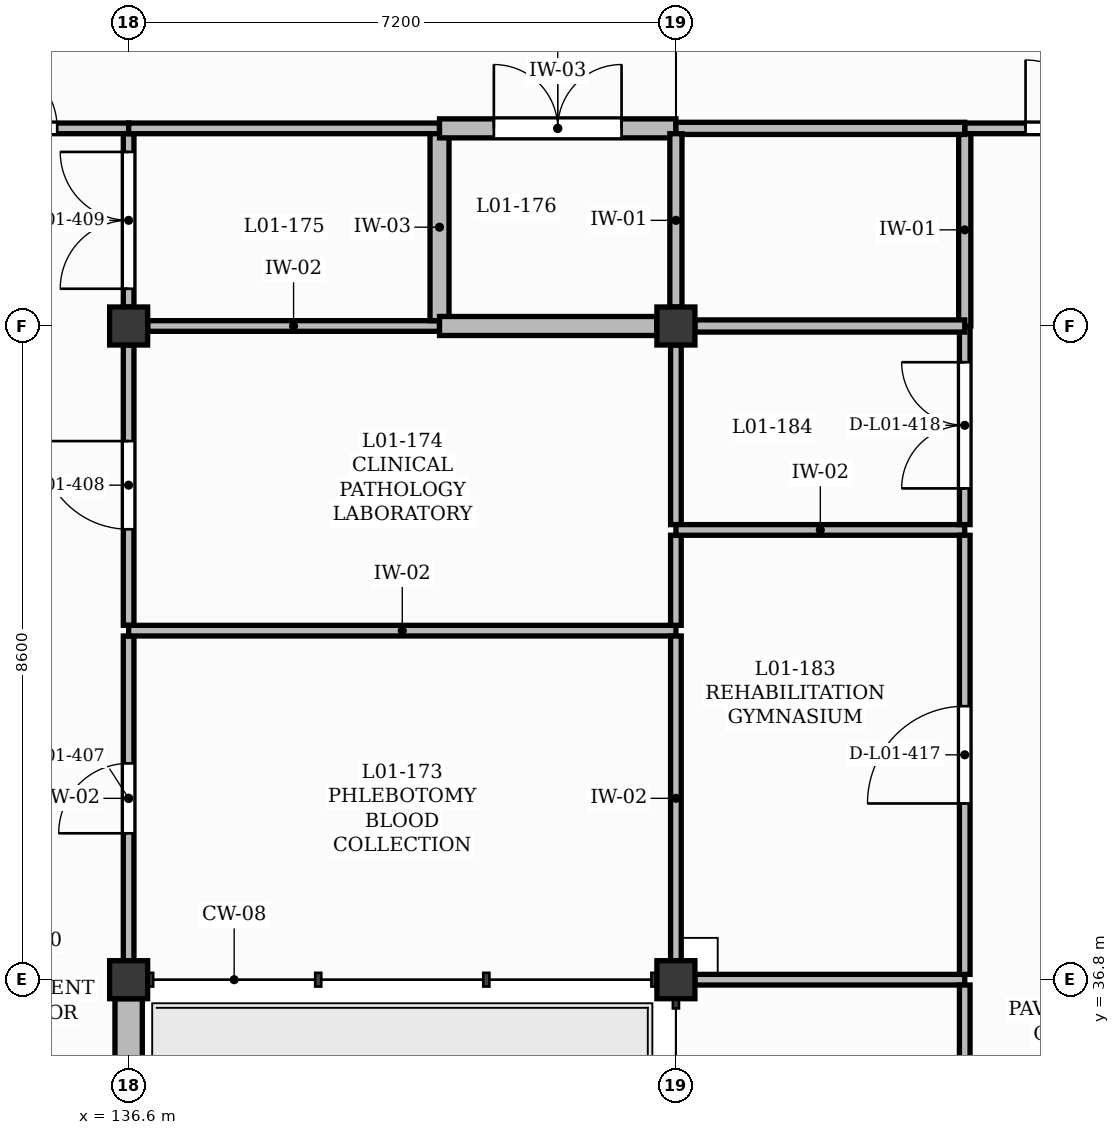
"""IFC4 building model, lengths in metres.
Left out: names, types, materials, properties, quantities, classifications, styles, units other than length and angle.
Written with IfcOpenShell. Run it as: python <this file> out.ifc"""

import sys

from ifc_helpers import new_model, si_unit, direction, frame, frame_2d, origin, origin_2d, place, context, subcontext, project, spatial, rectangle, extrude, element, fill, save


model = new_model("IFC4")
c1 = context("Model", 3, precision=1e-05, world=origin(), true_north=direction((0.0, 1.0)))
c2 = subcontext(c1, "Body", "Model", "MODEL_VIEW")
j1 = project(units=[si_unit("LENGTHUNIT", "METRE"), si_unit("PLANEANGLEUNIT", "RADIAN")], contexts=[c1])
p1 = place(None, origin())
s1 = spatial("IfcSite", under=j1, at=p1, CompositionType="ELEMENT")
p2 = place(p1, origin())
s2 = spatial("IfcBuilding", under=s1, at=p2, CompositionType="ELEMENT")
p3 = place(p2, frame((0.0, 0.0, 4.5)))
s3 = spatial("IfcBuildingStorey", under=s2, at=p3, CompositionType="ELEMENT", Elevation=4.5)
for number, where, z_axis, x_axis in (
    (1, (136.6, 36.8, 0.0), (0.0, 0.0, 1.0), (1.0, 0.0, 0.0)),
    (2, (136.6, 45.4, 0.0), (0.0, 0.0, 1.0), (1.0, 0.0, 0.0)),
    (3, (143.8, 36.8, 0.0), (0.0, 0.0, 1.0), (1.0, 0.0, 0.0)),
    (4, (143.8, 45.4, 0.0), (0.0, 0.0, 1.0), (1.0, 0.0, 0.0)),
):
    element("IfcColumn", number, at=place(p3, frame(where, z_axis=z_axis, x_axis=x_axis)), inside=s3, PredefinedType="COLUMN", context=c2, shape_type="SweptSolid", body=[
        extrude(rectangle(XDim=0.5, YDim=0.5, at=origin_2d()), origin(), (0.0, 0.0, 1.0), 4.22),
    ])
p4 = place(p3, frame((136.6, 27.45, 0.0), z_axis=(0.0, 0.0, 1.0), x_axis=(0.0, 1.0, 0.0)))
e5 = element("IfcWall", 5, at=p4, inside=s3, PredefinedType="SOLIDWALL", context=c2, shape_type="SweptSolid", body=[
    extrude(rectangle(XDim=9.1, YDim=0.36, at=frame_2d((4.55, 0.0))), origin(), (0.0, 0.0, 1.0), 3.52),
])
p5 = place(p4, frame((3.45, 0.0, 0.0)))
e6 = element("IfcOpeningElement", 6, at=p5, cuts=e5, PredefinedType="OPENING", context=c2, shape_type="SweptSolid", body=[
    extrude(rectangle(XDim=2.2, YDim=2.5, at=frame_2d((1.1, 1.25))), frame((0.0, 0.19, 0.0), z_axis=(0.0, -1.0, 0.0), x_axis=(1.0, 0.0, 0.0)), (0.0, 0.0, 1.0), 0.38),
])
p6 = place(p4, frame((0.915, 0.0, 1.5)))
e7 = element("IfcOpeningElement", 7, at=p6, cuts=e5, PredefinedType="OPENING", context=c2, shape_type="SweptSolid", body=[
    extrude(rectangle(XDim=1.68, YDim=1.25, at=frame_2d((0.84, 0.625))), frame((0.0, 0.19, 0.0), z_axis=(0.0, -1.0, 0.0), x_axis=(1.0, 0.0, 0.0)), (0.0, 0.0, 1.0), 0.38),
])
p7 = place(p4, frame((6.42, 0.0, 1.5)))
e8 = element("IfcOpeningElement", 8, at=p7, cuts=e5, PredefinedType="OPENING", context=c2, shape_type="SweptSolid", body=[
    extrude(rectangle(XDim=1.85, YDim=1.25, at=frame_2d((0.925, 0.625))), frame((0.0, 0.19, 0.0), z_axis=(0.0, -1.0, 0.0), x_axis=(1.0, 0.0, 0.0)), (0.0, 0.0, 1.0), 0.38),
])
p8 = place(p3, frame((133.8, 48.0, 0.0), z_axis=(0.0, 0.0, 1.0), x_axis=(1.0, 0.0, 0.0)))
e9 = element("IfcWall", 9, at=p8, inside=s3, PredefinedType="PARTITIONING", context=c2, shape_type="SweptSolid", body=[
    extrude(rectangle(XDim=2.8, YDim=0.14, at=frame_2d((1.4, 0.0))), origin(), (0.0, 0.0, 1.0), 4.18),
])
p9 = place(p8, frame((0.94, 0.0, 0.0)))
e10 = element("IfcOpeningElement", 10, at=p9, cuts=e9, PredefinedType="OPENING", context=c2, shape_type="SweptSolid", body=[
    extrude(rectangle(XDim=0.92, YDim=2.1, at=frame_2d((0.46, 1.05))), frame((0.0, 0.08, 0.0), z_axis=(0.0, -1.0, 0.0), x_axis=(1.0, 0.0, 0.0)), (0.0, 0.0, 1.0), 0.16),
])
p10 = place(p3, frame((136.6, 37.05, 0.0), z_axis=(0.0, 0.0, 1.0), x_axis=(0.0, 1.0, 0.0)))
e11 = element("IfcWall", 11, at=p10, inside=s3, PredefinedType="PARTITIONING", context=c2, shape_type="SweptSolid", body=[
    extrude(rectangle(XDim=4.272, YDim=0.14, at=frame_2d((2.136, 0.0))), origin(), (0.0, 0.0, 1.0), 3.52),
])
p11 = place(p10, frame((1.676, 0.0, 0.0)))
e12 = element("IfcOpeningElement", 12, at=p11, cuts=e11, PredefinedType="OPENING", context=c2, shape_type="SweptSolid", body=[
    extrude(rectangle(XDim=0.92, YDim=2.1, at=frame_2d((0.46, 1.05))), frame((0.0, 0.08, 0.0), z_axis=(0.0, -1.0, 0.0), x_axis=(1.0, 0.0, 0.0)), (0.0, 0.0, 1.0), 0.16),
])
p12 = place(p3, frame((136.6, 41.462, 0.0), z_axis=(0.0, 0.0, 1.0), x_axis=(0.0, 1.0, 0.0)))
e13 = element("IfcWall", 13, at=p12, inside=s3, PredefinedType="PARTITIONING", context=c2, shape_type="SweptSolid", body=[
    extrude(rectangle(XDim=3.688, YDim=0.14, at=frame_2d((1.844, 0.0))), origin(), (0.0, 0.0, 1.0), 3.52),
])
p13 = place(p12, frame((1.264, 0.0, 0.0)))
e14 = element("IfcOpeningElement", 14, at=p13, cuts=e13, PredefinedType="OPENING", context=c2, shape_type="SweptSolid", body=[
    extrude(rectangle(XDim=1.16, YDim=2.1, at=frame_2d((0.58, 1.05))), frame((0.0, 0.08, 0.0), z_axis=(0.0, -1.0, 0.0), x_axis=(1.0, 0.0, 0.0)), (0.0, 0.0, 1.0), 0.16),
])
p14 = place(p3, frame((136.6, 41.392, 0.0), z_axis=(0.0, 0.0, 1.0), x_axis=(1.0, 0.0, 0.0)))
e15 = element("IfcWall", 15, at=p14, inside=s3, PredefinedType="PARTITIONING", context=c2, shape_type="SweptSolid", body=[
    extrude(rectangle(XDim=7.2, YDim=0.14, at=frame_2d((3.6, 0.0))), origin(), (0.0, 0.0, 1.0), 4.18),
])
p15 = place(p3, frame((136.6, 45.65, 0.0), z_axis=(0.0, 0.0, 1.0), x_axis=(0.0, 1.0, 0.0)))
e16 = element("IfcWall", 16, at=p15, inside=s3, PredefinedType="PARTITIONING", context=c2, shape_type="SweptSolid", body=[
    extrude(rectangle(XDim=2.28, YDim=0.14, at=frame_2d((1.14, 0.0))), origin(), (0.0, 0.0, 1.0), 3.52),
])
p16 = place(p15, frame((0.24, 0.0, 0.0)))
e17 = element("IfcOpeningElement", 17, at=p16, cuts=e16, PredefinedType="OPENING", context=c2, shape_type="SweptSolid", body=[
    extrude(rectangle(XDim=1.8, YDim=2.3, at=frame_2d((0.9, 1.15))), frame((0.0, 0.08, 0.0), z_axis=(0.0, -1.0, 0.0), x_axis=(1.0, 0.0, 0.0)), (0.0, 0.0, 1.0), 0.16),
])
p17 = place(p3, frame((136.85, 45.4, 0.0), z_axis=(0.0, 0.0, 1.0), x_axis=(1.0, 0.0, 0.0)))
e18 = element("IfcWall", 18, at=p17, inside=s3, PredefinedType="PARTITIONING", context=c2, shape_type="SweptSolid", body=[
    extrude(rectangle(XDim=3.84, YDim=0.14, at=frame_2d((1.92, 0.0))), origin(), (0.0, 0.0, 1.0), 3.52),
])
p18 = place(p3, frame((136.6, 48.0, 0.0), z_axis=(0.0, 0.0, 1.0), x_axis=(1.0, 0.0, 0.0)))
e19 = element("IfcWall", 19, at=p18, inside=s3, PredefinedType="PARTITIONING", context=c2, shape_type="SweptSolid", body=[
    extrude(rectangle(XDim=4.09, YDim=0.14, at=frame_2d((2.045, 0.0))), origin(), (0.0, 0.0, 1.0), 4.18),
])
p19 = place(p3, frame((140.69, 45.47, 0.0), z_axis=(0.0, 0.0, 1.0), x_axis=(0.0, 1.0, 0.0)))
e20 = element("IfcWall", 20, at=p19, inside=s3, PredefinedType="SOLIDWALL", context=c2, shape_type="SweptSolid", body=[
    extrude(rectangle(XDim=2.46, YDim=0.25, at=frame_2d((1.23, 0.0))), origin(), (0.0, 0.0, 1.0), 4.18),
])
p20 = place(p3, frame((140.69, 45.4, 0.0), z_axis=(0.0, 0.0, 1.0), x_axis=(1.0, 0.0, 0.0)))
e21 = element("IfcWall", 21, at=p20, inside=s3, PredefinedType="SOLIDWALL", context=c2, shape_type="SweptSolid", body=[
    extrude(rectangle(XDim=2.86, YDim=0.25, at=frame_2d((1.43, 0.0))), origin(), (0.0, 0.0, 1.0), 3.52),
])
p21 = place(p3, frame((140.69, 48.0, 0.0), z_axis=(0.0, 0.0, 1.0), x_axis=(1.0, 0.0, 0.0)))
e22 = element("IfcWall", 22, at=p21, inside=s3, PredefinedType="SOLIDWALL", context=c2, shape_type="SweptSolid", body=[
    extrude(rectangle(XDim=3.11, YDim=0.25, at=frame_2d((1.555, 0.0))), origin(), (0.0, 0.0, 1.0), 4.18),
])
p22 = place(p21, frame((0.715, 0.0, 0.0)))
e23 = element("IfcOpeningElement", 23, at=p22, cuts=e22, PredefinedType="OPENING", context=c2, shape_type="SweptSolid", body=[
    extrude(rectangle(XDim=1.68, YDim=2.3, at=frame_2d((0.84, 1.15))), frame((0.0, 0.135, 0.0), z_axis=(0.0, -1.0, 0.0), x_axis=(1.0, 0.0, 0.0)), (0.0, 0.0, 1.0), 0.27),
])
p23 = place(p3, frame((143.8, 37.05, 0.0), z_axis=(0.0, 0.0, 1.0), x_axis=(0.0, 1.0, 0.0)))
e24 = element("IfcWall", 24, at=p23, inside=s3, PredefinedType="PARTITIONING", context=c2, shape_type="SweptSolid", body=[
    extrude(rectangle(XDim=4.272, YDim=0.14, at=frame_2d((2.136, 0.0))), origin(), (0.0, 0.0, 1.0), 3.52),
])
p24 = place(p3, frame((144.05, 36.8, 0.0), z_axis=(0.0, 0.0, 1.0), x_axis=(1.0, 0.0, 0.0)))
e25 = element("IfcWall", 25, at=p24, inside=s3, PredefinedType="PARTITIONING", context=c2, shape_type="SweptSolid", body=[
    extrude(rectangle(XDim=3.55, YDim=0.14, at=frame_2d((1.775, 0.0))), origin(), (0.0, 0.0, 1.0), 3.58),
])
p25 = place(p3, frame((143.8, 41.462, 0.0), z_axis=(0.0, 0.0, 1.0), x_axis=(0.0, 1.0, 0.0)))
e26 = element("IfcWall", 26, at=p25, inside=s3, PredefinedType="PARTITIONING", context=c2, shape_type="SweptSolid", body=[
    extrude(rectangle(XDim=1.185, YDim=0.14, at=frame_2d((0.593, 0.0))), origin(), (0.0, 0.0, 1.0), 3.52),
])
p26 = place(p3, frame((143.8, 42.787, 0.0), z_axis=(0.0, 0.0, 1.0), x_axis=(0.0, 1.0, 0.0)))
e27 = element("IfcWall", 27, at=p26, inside=s3, PredefinedType="PARTITIONING", context=c2, shape_type="SweptSolid", body=[
    extrude(rectangle(XDim=2.363, YDim=0.14, at=frame_2d((1.181, 0.0))), origin(), (0.0, 0.0, 1.0), 3.52),
])
p27 = place(p3, frame((143.8, 42.717, 0.0), z_axis=(0.0, 0.0, 1.0), x_axis=(1.0, 0.0, 0.0)))
e28 = element("IfcWall", 28, at=p27, inside=s3, PredefinedType="PARTITIONING", context=c2, shape_type="SweptSolid", body=[
    extrude(rectangle(XDim=3.8, YDim=0.14, at=frame_2d((1.9, 0.0))), origin(), (0.0, 0.0, 1.0), 4.18),
])
p28 = place(p3, frame((147.6, 31.744, 0.0), z_axis=(0.0, 0.0, 1.0), x_axis=(0.0, 1.0, 0.0)))
e29 = element("IfcWall", 29, at=p28, inside=s3, PredefinedType="PARTITIONING", context=c2, shape_type="SweptSolid", body=[
    extrude(rectangle(XDim=4.986, YDim=0.14, at=frame_2d((2.493, 0.0))), origin(), (0.0, 0.0, 1.0), 4.18),
])
p29 = place(p28, frame((1.663, 0.0, 0.0)))
e30 = element("IfcOpeningElement", 30, at=p29, cuts=e29, PredefinedType="OPENING", context=c2, shape_type="SweptSolid", body=[
    extrude(rectangle(XDim=1.66, YDim=2.3, at=frame_2d((0.83, 1.15))), frame((0.0, 0.08, 0.0), z_axis=(0.0, -1.0, 0.0), x_axis=(1.0, 0.0, 0.0)), (0.0, 0.0, 1.0), 0.16),
])
p30 = place(p3, frame((147.6, 36.87, 0.0), z_axis=(0.0, 0.0, 1.0), x_axis=(0.0, 1.0, 0.0)))
e31 = element("IfcWall", 31, at=p30, inside=s3, PredefinedType="PARTITIONING", context=c2, shape_type="SweptSolid", body=[
    extrude(rectangle(XDim=5.777, YDim=0.14, at=frame_2d((2.888, 0.0))), origin(), (0.0, 0.0, 1.0), 4.18),
])
p31 = place(p30, frame((2.249, 0.0, 0.0)))
e32 = element("IfcOpeningElement", 32, at=p31, cuts=e31, PredefinedType="OPENING", context=c2, shape_type="SweptSolid", body=[
    extrude(rectangle(XDim=1.28, YDim=2.2, at=frame_2d((0.64, 1.1))), frame((0.0, 0.08, 0.0), z_axis=(0.0, -1.0, 0.0), x_axis=(1.0, 0.0, 0.0)), (0.0, 0.0, 1.0), 0.16),
])
p32 = place(p3, frame((147.6, 42.787, 0.0), z_axis=(0.0, 0.0, 1.0), x_axis=(0.0, 1.0, 0.0)))
e33 = element("IfcWall", 33, at=p32, inside=s3, PredefinedType="PARTITIONING", context=c2, shape_type="SweptSolid", body=[
    extrude(rectangle(XDim=2.613, YDim=0.14, at=frame_2d((1.306, 0.0))), origin(), (0.0, 0.0, 1.0), 4.18),
])
p33 = place(p32, frame((0.477, 0.0, 0.0)))
e34 = element("IfcOpeningElement", 34, at=p33, cuts=e33, PredefinedType="OPENING", context=c2, shape_type="SweptSolid", body=[
    extrude(rectangle(XDim=1.66, YDim=2.3, at=frame_2d((0.83, 1.15))), frame((0.0, 0.08, 0.0), z_axis=(0.0, -1.0, 0.0), x_axis=(1.0, 0.0, 0.0)), (0.0, 0.0, 1.0), 0.16),
])
p34 = place(p3, frame((147.6, 48.0, 0.0), z_axis=(0.0, 0.0, 1.0), x_axis=(1.0, 0.0, 0.0)))
e35 = element("IfcWall", 35, at=p34, inside=s3, PredefinedType="PARTITIONING", context=c2, shape_type="SweptSolid", body=[
    extrude(rectangle(XDim=3.4, YDim=0.14, at=frame_2d((1.7, 0.0))), origin(), (0.0, 0.0, 1.0), 4.18),
])
p35 = place(p34, frame((0.8, 0.0, 0.0)))
e36 = element("IfcOpeningElement", 36, at=p35, cuts=e35, PredefinedType="OPENING", context=c2, shape_type="SweptSolid", body=[
    extrude(rectangle(XDim=1.8, YDim=2.3, at=frame_2d((0.9, 1.15))), frame((0.0, 0.08, 0.0), z_axis=(0.0, -1.0, 0.0), x_axis=(1.0, 0.0, 0.0)), (0.0, 0.0, 1.0), 0.16),
])
p36 = place(p3, frame((147.6, 45.4, 0.0), z_axis=(0.0, 0.0, 1.0), x_axis=(0.0, 1.0, 0.0)))
e37 = element("IfcWall", 37, at=p36, inside=s3, PredefinedType="PARTITIONING", context=c2, shape_type="SweptSolid", body=[
    extrude(rectangle(XDim=2.53, YDim=0.16, at=frame_2d((1.265, 0.0))), origin(), (0.0, 0.0, 1.0), 4.18),
])
p37 = place(p3, frame((143.8, 48.0, 0.0), z_axis=(0.0, 0.0, 1.0), x_axis=(1.0, 0.0, 0.0)))
e38 = element("IfcWall", 38, at=p37, inside=s3, PredefinedType="PARTITIONING", context=c2, shape_type="SweptSolid", body=[
    extrude(rectangle(XDim=3.8, YDim=0.16, at=frame_2d((1.9, 0.0))), origin(), (0.0, 0.0, 1.0), 4.18),
])
p38 = place(p3, frame((143.8, 45.65, 0.0), z_axis=(0.0, 0.0, 1.0), x_axis=(0.0, 1.0, 0.0)))
e39 = element("IfcWall", 39, at=p38, inside=s3, PredefinedType="PARTITIONING", context=c2, shape_type="SweptSolid", body=[
    extrude(rectangle(XDim=2.28, YDim=0.16, at=frame_2d((1.14, 0.0))), origin(), (0.0, 0.0, 1.0), 3.52),
])
p39 = place(p3, frame((147.6, 45.4, 0.0), z_axis=(0.0, 0.0, 1.0), x_axis=(-1.0, 0.0, 0.0)))
e40 = element("IfcWall", 40, at=p39, inside=s3, PredefinedType="PARTITIONING", context=c2, shape_type="SweptSolid", body=[
    extrude(rectangle(XDim=3.55, YDim=0.16, at=frame_2d((1.775, 0.0))), origin(), (0.0, 0.0, 1.0), 3.62),
])
p40 = place(p35, origin())
e41 = element("IfcDoor", 41, at=p40, inside=s3, OperationType="DOUBLE_DOOR_SINGLE_SWING", PredefinedType="DOOR", context=c2, shape_type="SweptSolid", body=[
    extrude(rectangle(XDim=1.8, YDim=2.3, at=frame_2d((0.9, 1.15))), frame((0.0, 0.025, 0.0), z_axis=(0.0, -1.0, 0.0), x_axis=(1.0, 0.0, 0.0)), (0.0, 0.0, 1.0), 0.05),
])
fill(e36, e41)
p41 = place(p9, origin())
e42 = element("IfcDoor", 42, at=p41, inside=s3, OperationType="SINGLE_SWING_LEFT", PredefinedType="DOOR", context=c2, shape_type="SweptSolid", body=[
    extrude(rectangle(XDim=0.92, YDim=2.1, at=frame_2d((0.46, 1.05))), frame((0.0, 0.025, 0.0), z_axis=(0.0, -1.0, 0.0), x_axis=(1.0, 0.0, 0.0)), (0.0, 0.0, 1.0), 0.05),
])
fill(e10, e42)
p42 = place(p11, origin())
e43 = element("IfcDoor", 43, at=p42, inside=s3, OperationType="SINGLE_SWING_LEFT", PredefinedType="DOOR", context=c2, shape_type="SweptSolid", body=[
    extrude(rectangle(XDim=0.92, YDim=2.1, at=frame_2d((0.46, 1.05))), frame((0.0, 0.025, 0.0), z_axis=(0.0, -1.0, 0.0), x_axis=(1.0, 0.0, 0.0)), (0.0, 0.0, 1.0), 0.05),
])
fill(e12, e43)
p43 = place(p13, origin())
e44 = element("IfcDoor", 44, at=p43, inside=s3, OperationType="SINGLE_SWING_RIGHT", PredefinedType="DOOR", context=c2, shape_type="SweptSolid", body=[
    extrude(rectangle(XDim=1.16, YDim=2.1, at=frame_2d((0.58, 1.05))), frame((0.0, 0.025, 0.0), z_axis=(0.0, -1.0, 0.0), x_axis=(1.0, 0.0, 0.0)), (0.0, 0.0, 1.0), 0.05),
])
fill(e14, e44)
p44 = place(p16, origin())
e45 = element("IfcDoor", 45, at=p44, inside=s3, OperationType="DOUBLE_DOOR_SINGLE_SWING", PredefinedType="DOOR", context=c2, shape_type="SweptSolid", body=[
    extrude(rectangle(XDim=1.8, YDim=2.3, at=frame_2d((0.9, 1.15))), frame((0.0, 0.025, 0.0), z_axis=(0.0, -1.0, 0.0), x_axis=(1.0, 0.0, 0.0)), (0.0, 0.0, 1.0), 0.05),
])
fill(e17, e45)
p45 = place(p22, origin())
e46 = element("IfcDoor", 46, at=p45, inside=s3, OperationType="DOUBLE_DOOR_SINGLE_SWING", PredefinedType="DOOR", context=c2, shape_type="SweptSolid", body=[
    extrude(rectangle(XDim=1.68, YDim=2.3, at=frame_2d((0.84, 1.15))), frame((0.0, 0.025, 0.0), z_axis=(0.0, -1.0, 0.0), x_axis=(1.0, 0.0, 0.0)), (0.0, 0.0, 1.0), 0.05),
])
fill(e23, e46)
p46 = place(p31, origin())
e47 = element("IfcDoor", 47, at=p46, inside=s3, OperationType="SINGLE_SWING_LEFT", PredefinedType="DOOR", context=c2, shape_type="SweptSolid", body=[
    extrude(rectangle(XDim=1.28, YDim=2.2, at=frame_2d((0.64, 1.1))), frame((0.0, 0.025, 0.0), z_axis=(0.0, -1.0, 0.0), x_axis=(1.0, 0.0, 0.0)), (0.0, 0.0, 1.0), 0.05),
])
fill(e32, e47)
p47 = place(p33, origin())
e48 = element("IfcDoor", 48, at=p47, inside=s3, OperationType="DOUBLE_DOOR_SINGLE_SWING", PredefinedType="DOOR", context=c2, shape_type="SweptSolid", body=[
    extrude(rectangle(XDim=1.66, YDim=2.3, at=frame_2d((0.83, 1.15))), frame((0.0, 0.025, 0.0), z_axis=(0.0, -1.0, 0.0), x_axis=(1.0, 0.0, 0.0)), (0.0, 0.0, 1.0), 0.05),
])
fill(e34, e48)
save(model, sys.argv[1])
